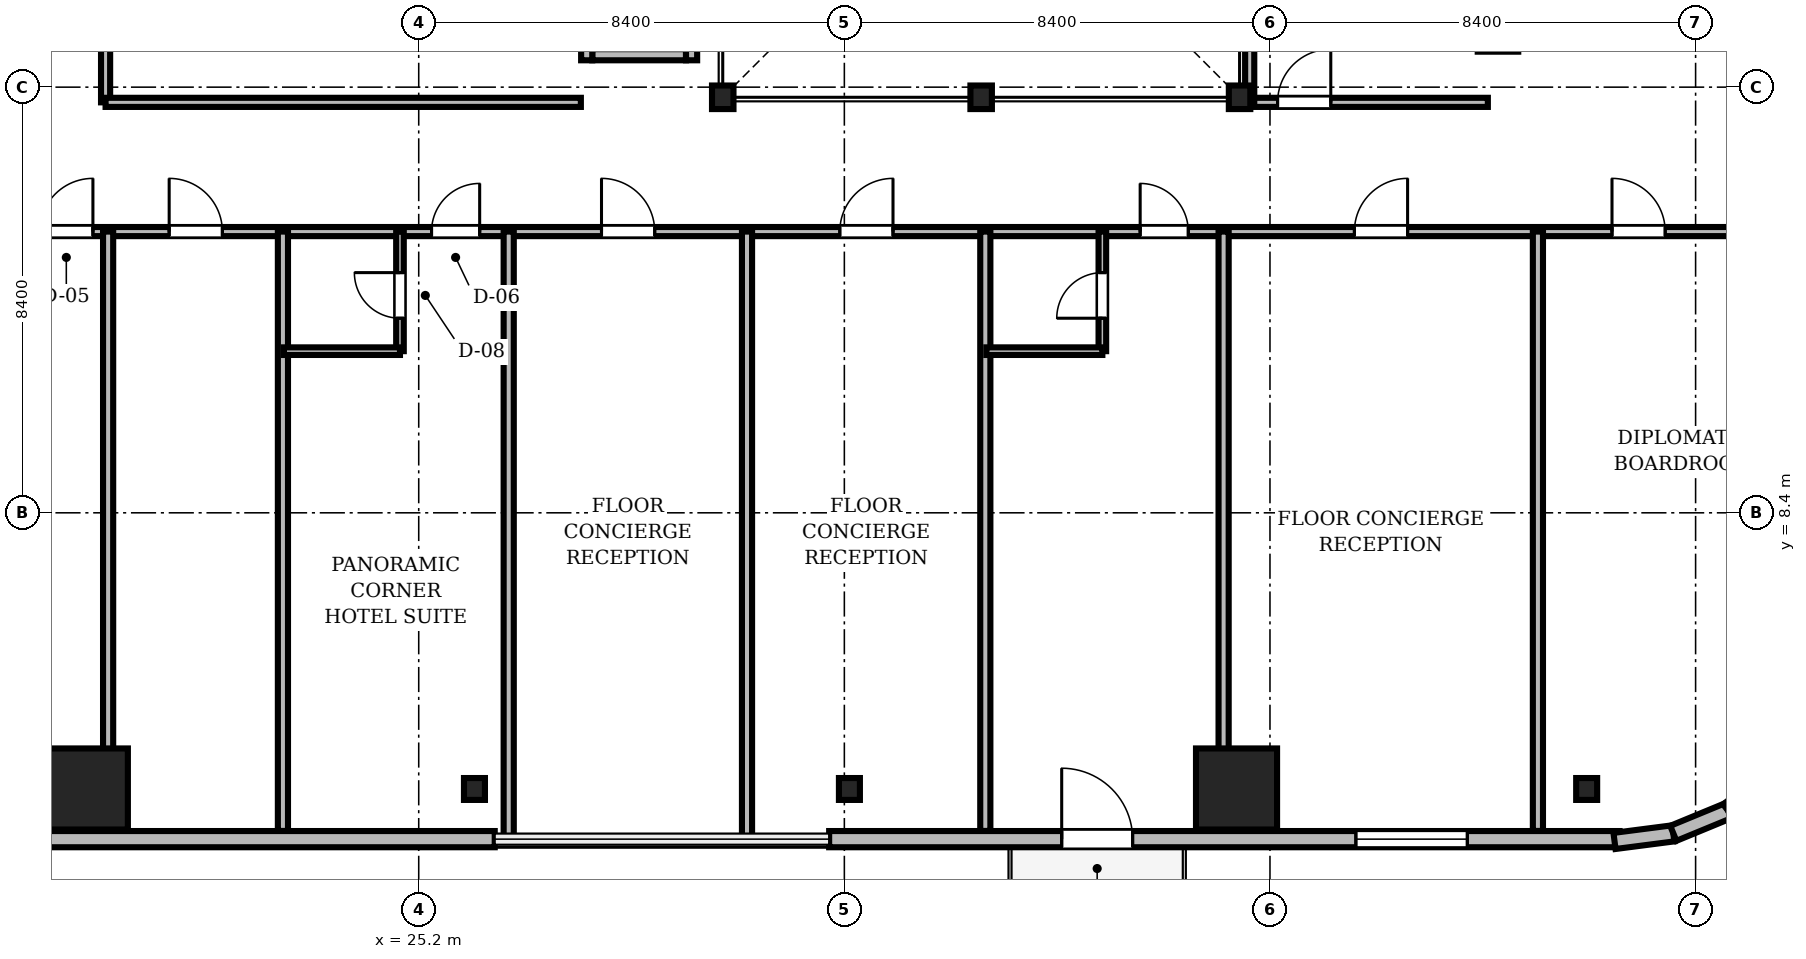
"""IFC4 building model, lengths in metres.
Left out: names, types, materials, properties, quantities, classifications, styles, units other than length and angle.
Written with IfcOpenShell. Run it as: python <this file> out.ifc"""

import sys

from ifc_helpers import new_model, si_unit, direction, frame, frame_2d, origin, origin_2d, place, context, subcontext, project, spatial, rectangle, i_section, extrude, source, transform, mapped, element, fill, save


model = new_model("IFC4")
c1 = context("Model", 3, precision=1e-05, world=origin(), true_north=direction((0.0, 1.0)))
c2 = subcontext(c1, "Body", "Model", "MODEL_VIEW")
j1 = project(units=[si_unit("LENGTHUNIT", "METRE"), si_unit("PLANEANGLEUNIT", "RADIAN")], contexts=[c1])
p1 = place(None, origin())
s1 = spatial("IfcSite", under=j1, at=p1, CompositionType="ELEMENT")
p2 = place(p1, origin())
s2 = spatial("IfcBuilding", under=s1, at=p2, CompositionType="ELEMENT")
p3 = place(p2, frame((0.0, 0.0, 152.0)))
s3 = spatial("IfcBuildingStorey", under=s2, at=p3, CompositionType="ELEMENT", Elevation=152.0)
m1 = source(origin(), c2, "Body", "SweptSolid", [
    extrude(i_section(OverallWidth=0.424, OverallDepth=0.465, WebThickness=0.035, FlangeThickness=0.056, FilletRadius=0.015, at=origin_2d()), origin(), (0.0, 0.0, 1.0), 3.46),
])
for number, where, z_axis, x_axis in (
    (1, (31.2, 16.6, 0.0), (0.0, 0.0, 1.0), (1.0, 0.0, 0.0)),
    (2, (36.3, 16.6, 0.0), (0.0, 0.0, 1.0), (1.0, 0.0, 0.0)),
    (3, (41.4, 16.6, 0.0), (0.0, 0.0, 1.0), (1.0, 0.0, 0.0)),
):
    element("IfcColumn", number, at=place(p3, frame(where, z_axis=z_axis, x_axis=x_axis)), inside=s3, PredefinedType="COLUMN", context=c2, shape_type="MappedRepresentation", body=[
        mapped(m1, transform((0.0, 0.0, 0.0), scale=1.0)),
    ])
m2 = source(origin(), c2, "Body", "SweptSolid", [
    extrude(rectangle(XDim=1.6, YDim=1.6, at=origin_2d()), origin(), (0.0, 0.0, 1.0), 3.46),
])
for number, where, z_axis, x_axis in (
    (4, (18.66, 2.95, 0.0), (0.0, 0.0, 1.0), (1.0, 0.0, 0.0)),
    (5, (41.34, 2.95, 0.0), (0.0, 0.0, 1.0), (1.0, 0.0, 0.0)),
):
    element("IfcColumn", number, at=place(p3, frame(where, z_axis=z_axis, x_axis=x_axis)), inside=s3, PredefinedType="COLUMN", context=c2, shape_type="MappedRepresentation", body=[
        mapped(m2, transform((0.0, 0.0, 0.0), scale=1.0)),
    ])
m3 = source(origin(), c2, "Body", "SweptSolid", [
    extrude(i_section(OverallWidth=0.414, OverallDepth=0.432, WebThickness=0.026, FlangeThickness=0.04, FilletRadius=0.015, at=origin_2d()), origin(), (0.0, 0.0, 1.0), 3.46),
])
for number, where, z_axis, x_axis in (
    (6, (26.3, 2.95, 0.0), (0.0, 0.0, 1.0), (1.0, 0.0, 0.0)),
    (7, (33.7, 2.95, 0.0), (0.0, 0.0, 1.0), (1.0, 0.0, 0.0)),
    (8, (48.25, 2.95, 0.0), (0.0, 0.0, 1.0), (1.0, 0.0, 0.0)),
):
    element("IfcColumn", number, at=place(p3, frame(where, z_axis=z_axis, x_axis=x_axis)), inside=s3, PredefinedType="COLUMN", context=c2, shape_type="MappedRepresentation", body=[
        mapped(m3, transform((0.0, 0.0, 0.0), scale=1.0)),
    ])
m4 = source(origin(), c2, "Body", "SweptSolid", [
    extrude(rectangle(XDim=15.6, YDim=0.32, at=frame_2d((7.8, 0.0))), origin(), (0.0, 0.0, 1.0), 3.46),
])
p4 = place(p3, frame((11.1, 1.96, 0.0), z_axis=(0.0, 0.0, 1.0), x_axis=(1.0, 0.0, 0.0)))
e9 = element("IfcWall", 9, at=p4, inside=s3, PredefinedType="SOLIDWALL", context=c2, shape_type="MappedRepresentation", body=[
    mapped(m4, transform((0.0, 0.0, 0.0), scale=1.0)),
])
m5 = source(origin(), c2, "Body", "SweptSolid", [
    extrude(rectangle(XDim=2.2, YDim=2.4, at=frame_2d((1.1, 1.2))), frame((0.0, 0.17, 0.0), z_axis=(0.0, -1.0, 0.0), x_axis=(1.0, 0.0, 0.0)), (0.0, 0.0, 1.0), 0.34),
])
p5 = place(p4, frame((3.005, 0.0, 0.72)))
e10 = element("IfcOpeningElement", 10, at=p5, cuts=e9, PredefinedType="OPENING", context=c2, shape_type="MappedRepresentation", body=[
    mapped(m5, transform((0.0, 0.0, 0.0), scale=1.0)),
])
p6 = place(p3, frame((33.3, 1.96, 0.0), z_axis=(0.0, 0.0, 1.0), x_axis=(1.0, 0.0, 0.0)))
e11 = element("IfcWall", 11, at=p6, inside=s3, PredefinedType="SOLIDWALL", context=c2, shape_type="MappedRepresentation", body=[
    mapped(m4, transform((0.0, 0.0, 0.0), scale=1.0)),
])
m6 = source(origin(), c2, "Body", "SweptSolid", [
    extrude(rectangle(XDim=1.4, YDim=2.3, at=frame_2d((0.7, 1.15))), frame((0.0, 0.17, 0.0), z_axis=(0.0, -1.0, 0.0), x_axis=(1.0, 0.0, 0.0)), (0.0, 0.0, 1.0), 0.34),
])
p7 = place(p6, frame((4.59, 0.0, 0.0)))
e12 = element("IfcOpeningElement", 12, at=p7, cuts=e11, PredefinedType="OPENING", context=c2, shape_type="MappedRepresentation", body=[
    mapped(m6, transform((0.0, 0.0, 0.0), scale=1.0)),
])
p8 = place(p6, frame((10.395, 0.0, 0.72)))
e13 = element("IfcOpeningElement", 13, at=p8, cuts=e11, PredefinedType="OPENING", context=c2, shape_type="MappedRepresentation", body=[
    mapped(m5, transform((0.0, 0.0, 0.0), scale=1.0)),
])
m7 = source(origin(), c2, "Body", "SweptSolid", [
    extrude(rectangle(XDim=1.17, YDim=0.32, at=frame_2d((0.585, 0.0))), origin(), (0.0, 0.0, 1.0), 3.46),
])
p9 = place(p3, frame((48.8, 1.925, 0.0), z_axis=(0.0, 0.0, 1.0), x_axis=(0.991762485493, 0.128090485085, 0.0)))
e14 = element("IfcWall", 14, at=p9, inside=s3, PredefinedType="SOLIDWALL", context=c2, shape_type="MappedRepresentation", body=[
    mapped(m7, transform((0.0, 0.0, 0.0), scale=1.0)),
])
m8 = source(origin(), c2, "Body", "SweptSolid", [
    extrude(rectangle(XDim=1.169, YDim=0.32, at=frame_2d((0.585, 0.0))), origin(), (0.0, 0.0, 1.0), 3.46),
])
p10 = place(p3, frame((49.96, 2.074, 0.0), z_axis=(0.0, 0.0, 1.0), x_axis=(0.924479075121, 0.381232789334, 0.0)))
e15 = element("IfcWall", 15, at=p10, inside=s3, PredefinedType="SOLIDWALL", context=c2, shape_type="MappedRepresentation", body=[
    mapped(m8, transform((0.0, 0.0, 0.0), scale=1.0)),
])
m9 = source(origin(), c2, "Body", "SweptSolid", [
    extrude(rectangle(XDim=1.169, YDim=0.32, at=frame_2d((0.584, 0.0))), origin(), (0.0, 0.0, 1.0), 3.46),
])
p11 = place(p3, frame((51.041, 2.52, 0.0), z_axis=(0.0, 0.0, 1.0), x_axis=(0.793663520347, 0.608356981114, 0.0)))
e16 = element("IfcWall", 16, at=p11, inside=s3, PredefinedType="SOLIDWALL", context=c2, shape_type="MappedRepresentation", body=[
    mapped(m9, transform((0.0, 0.0, 0.0), scale=1.0)),
])
m10 = source(origin(), c2, "Body", "SweptSolid", [
    extrude(rectangle(XDim=1.85, YDim=0.22, at=frame_2d((0.925, 0.0))), origin(), (0.0, 0.0, 1.0), 3.46),
])
p12 = place(p3, frame((28.625, 17.44, 0.0), z_axis=(0.0, 0.0, 1.0), x_axis=(1.0, 0.0, 0.0)))
e17 = element("IfcWall", 17, at=p12, inside=s3, PredefinedType="SOLIDWALL", context=c2, shape_type="MappedRepresentation", body=[
    mapped(m10, transform((0.0, 0.0, 0.0), scale=1.0)),
])
m11 = source(origin(), c2, "Body", "SweptSolid", [
    extrude(rectangle(XDim=2.54, YDim=0.22, at=frame_2d((1.27, 0.0))), origin(), (0.0, 0.0, 1.0), 3.46),
])
for number, where, z_axis, x_axis in (
    (18, (28.515, 17.33, 0.0), (0.0, 0.0, 1.0), (0.0, 1.0, 0.0)),
    (19, (30.585, 17.33, 0.0), (0.0, 0.0, 1.0), (0.0, 1.0, 0.0)),
):
    element("IfcWall", number, at=place(p3, frame(where, z_axis=z_axis, x_axis=x_axis)), inside=s3, PredefinedType="SOLIDWALL", context=c2, shape_type="MappedRepresentation", body=[
        mapped(m11, transform((0.0, 0.0, 0.0), scale=1.0)),
    ])
m12 = source(origin(), c2, "Body", "SweptSolid", [
    extrude(rectangle(XDim=46.156, YDim=0.18, at=frame_2d((23.078, 0.0))), origin(), (0.0, 0.0, 1.0), 2.702),
])
p13 = place(p3, frame((6.922, 13.95, 0.0), z_axis=(0.0, 0.0, 1.0), x_axis=(1.0, 0.0, 0.0)))
e20 = element("IfcWall", 20, at=p13, inside=s3, PredefinedType="PARTITIONING", context=c2, shape_type="MappedRepresentation", body=[
    mapped(m12, transform((0.0, 0.0, 0.0), scale=1.0)),
])
m13 = source(origin(), c2, "Body", "SweptSolid", [
    extrude(rectangle(XDim=1.05, YDim=2.2, at=frame_2d((0.525, 1.1))), frame((0.0, 0.1, 0.0), z_axis=(0.0, -1.0, 0.0), x_axis=(1.0, 0.0, 0.0)), (0.0, 0.0, 1.0), 0.2),
])
p14 = place(p13, frame((10.798, 0.0, 0.0)))
e21 = element("IfcOpeningElement", 21, at=p14, cuts=e20, PredefinedType="OPENING", context=c2, shape_type="MappedRepresentation", body=[
    mapped(m13, transform((0.0, 0.0, 0.0), scale=1.0)),
])
p15 = place(p13, frame((13.353, 0.0, 0.0)))
e22 = element("IfcOpeningElement", 22, at=p15, cuts=e20, PredefinedType="OPENING", context=c2, shape_type="MappedRepresentation", body=[
    mapped(m13, transform((0.0, 0.0, 0.0), scale=1.0)),
])
m14 = source(origin(), c2, "Body", "SweptSolid", [
    extrude(rectangle(XDim=0.95, YDim=2.15, at=frame_2d((0.475, 1.075))), frame((0.0, 0.1, 0.0), z_axis=(0.0, -1.0, 0.0), x_axis=(1.0, 0.0, 0.0)), (0.0, 0.0, 1.0), 0.2),
])
p16 = place(p13, frame((18.531, 0.0, 0.0)))
e23 = element("IfcOpeningElement", 23, at=p16, cuts=e20, PredefinedType="OPENING", context=c2, shape_type="MappedRepresentation", body=[
    mapped(m14, transform((0.0, 0.0, 0.0), scale=1.0)),
])
p17 = place(p13, frame((21.885, 0.0, 0.0)))
e24 = element("IfcOpeningElement", 24, at=p17, cuts=e20, PredefinedType="OPENING", context=c2, shape_type="MappedRepresentation", body=[
    mapped(m13, transform((0.0, 0.0, 0.0), scale=1.0)),
])
p18 = place(p13, frame((26.588, 0.0, 0.0)))
e25 = element("IfcOpeningElement", 25, at=p18, cuts=e20, PredefinedType="OPENING", context=c2, shape_type="MappedRepresentation", body=[
    mapped(m13, transform((0.0, 0.0, 0.0), scale=1.0)),
])
p19 = place(p13, frame((32.516, 0.0, 0.0)))
e26 = element("IfcOpeningElement", 26, at=p19, cuts=e20, PredefinedType="OPENING", context=c2, shape_type="MappedRepresentation", body=[
    mapped(m14, transform((0.0, 0.0, 0.0), scale=1.0)),
])
p20 = place(p13, frame((36.744, 0.0, 0.0)))
e27 = element("IfcOpeningElement", 27, at=p20, cuts=e20, PredefinedType="OPENING", context=c2, shape_type="MappedRepresentation", body=[
    mapped(m13, transform((0.0, 0.0, 0.0), scale=1.0)),
])
p21 = place(p13, frame((41.828, 0.0, 0.0)))
e28 = element("IfcOpeningElement", 28, at=p21, cuts=e20, PredefinedType="OPENING", context=c2, shape_type="MappedRepresentation", body=[
    mapped(m13, transform((0.0, 0.0, 0.0), scale=1.0)),
])
m15 = source(origin(), c2, "Body", "SweptSolid", [
    extrude(rectangle(XDim=11.94, YDim=0.18, at=frame_2d((5.97, 0.0))), origin(), (0.0, 0.0, 1.0), 2.852),
])
p22 = place(p3, frame((19.02, 16.5, 0.0), z_axis=(0.0, 0.0, 1.0), x_axis=(0.0, 1.0, 0.0)))
e29 = element("IfcWall", 29, at=p22, inside=s3, PredefinedType="PARTITIONING", context=c2, shape_type="MappedRepresentation", body=[
    mapped(m15, transform((0.0, 0.0, 0.0), scale=1.0)),
])
p23 = place(p22, frame((4.5, 0.0, 0.0)))
e30 = element("IfcOpeningElement", 30, at=p23, cuts=e29, PredefinedType="OPENING", context=c2, shape_type="MappedRepresentation", body=[
    mapped(m13, transform((0.0, 0.0, 0.0), scale=1.0)),
])
m16 = source(origin(), c2, "Body", "SweptSolid", [
    extrude(rectangle(XDim=4.7, YDim=0.18, at=frame_2d((2.35, 0.0))), origin(), (0.0, 0.0, 1.0), 2.852),
])
p24 = place(p3, frame((41.6, 16.5, 0.0), z_axis=(0.0, 0.0, 1.0), x_axis=(1.0, 0.0, 0.0)))
e31 = element("IfcWall", 31, at=p24, inside=s3, PredefinedType="PARTITIONING", context=c2, shape_type="MappedRepresentation", body=[
    mapped(m16, transform((0.0, 0.0, 0.0), scale=1.0)),
])
p25 = place(p24, frame((0.55, 0.0, 0.0)))
e32 = element("IfcOpeningElement", 32, at=p25, cuts=e31, PredefinedType="OPENING", context=c2, shape_type="MappedRepresentation", body=[
    mapped(m13, transform((0.0, 0.0, 0.0), scale=1.0)),
])
m17 = source(origin(), c2, "Body", "SweptSolid", [
    extrude(rectangle(XDim=2.36, YDim=0.15, at=frame_2d((1.18, 0.0))), origin(), (0.0, 0.0, 1.0), 3.122),
])
p26 = place(p3, frame((24.83, 11.59, 0.0), z_axis=(0.0, 0.0, 1.0), x_axis=(0.0, 1.0, 0.0)))
e33 = element("IfcWall", 33, at=p26, inside=s3, PredefinedType="PARTITIONING", context=c2, shape_type="MappedRepresentation", body=[
    mapped(m17, transform((0.0, 0.0, 0.0), scale=1.0)),
])
m18 = source(origin(), c2, "Body", "SweptSolid", [
    extrude(rectangle(XDim=0.9, YDim=2.1, at=frame_2d((0.45, 1.05))), frame((0.0, 0.085, 0.0), z_axis=(0.0, -1.0, 0.0), x_axis=(1.0, 0.0, 0.0)), (0.0, 0.0, 1.0), 0.17),
])
p27 = place(p26, frame((0.65, 0.0, 0.0)))
e34 = element("IfcOpeningElement", 34, at=p27, cuts=e33, PredefinedType="OPENING", context=c2, shape_type="MappedRepresentation", body=[
    mapped(m18, transform((0.0, 0.0, 0.0), scale=1.0)),
])
p28 = place(p3, frame((38.692, 11.59, 0.0), z_axis=(0.0, 0.0, 1.0), x_axis=(0.0, 1.0, 0.0)))
e35 = element("IfcWall", 35, at=p28, inside=s3, PredefinedType="PARTITIONING", context=c2, shape_type="MappedRepresentation", body=[
    mapped(m17, transform((0.0, 0.0, 0.0), scale=1.0)),
])
p29 = place(p28, frame((0.65, 0.0, 0.0)))
e36 = element("IfcOpeningElement", 36, at=p29, cuts=e35, PredefinedType="OPENING", context=c2, shape_type="MappedRepresentation", body=[
    mapped(m18, transform((0.0, 0.0, 0.0), scale=1.0)),
])
m19 = source(origin(), c2, "Body", "SweptSolid", [
    extrude(rectangle(XDim=11.828, YDim=0.2, at=frame_2d((5.914, 0.0))), origin(), (0.0, 0.0, 1.0), 2.702),
])
for number, where, z_axis, x_axis in (
    (37, (19.07, 2.122, 0.0), (0.0, 0.0, 1.0), (0.0, 1.0, 0.0)),
    (38, (22.52, 2.122, 0.0), (0.0, 0.0, 1.0), (0.0, 1.0, 0.0)),
):
    element("IfcWall", number, at=place(p3, frame(where, z_axis=z_axis, x_axis=x_axis)), inside=s3, PredefinedType="PARTITIONING", context=c2, shape_type="MappedRepresentation", body=[
        mapped(m19, transform((0.0, 0.0, 0.0), scale=1.0)),
    ])
m20 = source(origin(), c2, "Body", "SweptSolid", [
    extrude(rectangle(XDim=12.02, YDim=0.2, at=frame_2d((6.01, 0.0))), origin(), (0.0, 0.0, 1.0), 2.702),
])
for number, where, z_axis, x_axis in (
    (39, (26.976, 1.93, 0.0), (0.0, 0.0, 1.0), (0.0, 1.0, 0.0)),
    (40, (31.679, 1.93, 0.0), (0.0, 0.0, 1.0), (0.0, 1.0, 0.0)),
):
    element("IfcWall", number, at=place(p3, frame(where, z_axis=z_axis, x_axis=x_axis)), inside=s3, PredefinedType="PARTITIONING", context=c2, shape_type="MappedRepresentation", body=[
        mapped(m20, transform((0.0, 0.0, 0.0), scale=1.0)),
    ])
for number, where, z_axis, x_axis in (
    (41, (36.382, 2.122, 0.0), (0.0, 0.0, 1.0), (0.0, 1.0, 0.0)),
    (42, (41.085, 2.122, 0.0), (0.0, 0.0, 1.0), (0.0, 1.0, 0.0)),
    (43, (47.288, 2.122, 0.0), (0.0, 0.0, 1.0), (0.0, 1.0, 0.0)),
):
    element("IfcWall", number, at=place(p3, frame(where, z_axis=z_axis, x_axis=x_axis)), inside=s3, PredefinedType="PARTITIONING", context=c2, shape_type="MappedRepresentation", body=[
        mapped(m19, transform((0.0, 0.0, 0.0), scale=1.0)),
    ])
m21 = source(origin(), c2, "Body", "SweptSolid", [
    extrude(rectangle(XDim=9.38, YDim=0.18, at=frame_2d((4.69, 0.0))), origin(), (0.0, 0.0, 1.0), 3.46),
])
p30 = place(p3, frame((19.02, 16.5, 0.0), z_axis=(0.0, 0.0, 1.0), x_axis=(1.0, 0.0, 0.0)))
e44 = element("IfcWall", 44, at=p30, inside=s3, PredefinedType="PARTITIONING", context=c2, shape_type="MappedRepresentation", body=[
    mapped(m21, transform((0.0, 0.0, 0.0), scale=1.0)),
])
m22 = source(origin(), c2, "Body", "SweptSolid", [
    extrude(rectangle(XDim=7.15, YDim=0.18, at=frame_2d((3.575, 0.0))), origin(), (0.0, 0.0, 1.0), 2.852),
])
p31 = place(p3, frame((41.6, 16.5, 0.0), z_axis=(0.0, 0.0, 1.0), x_axis=(0.0, 1.0, 0.0)))
e45 = element("IfcWall", 45, at=p31, inside=s3, PredefinedType="PARTITIONING", context=c2, shape_type="MappedRepresentation", body=[
    mapped(m22, transform((0.0, 0.0, 0.0), scale=1.0)),
])
m23 = source(origin(), c2, "Body", "SweptSolid", [
    extrude(rectangle(XDim=2.29, YDim=0.15, at=frame_2d((1.145, 0.0))), origin(), (0.0, 0.0, 1.0), 3.46),
])
p32 = place(p3, frame((22.54, 11.59, 0.0), z_axis=(0.0, 0.0, 1.0), x_axis=(1.0, 0.0, 0.0)))
e46 = element("IfcWall", 46, at=p32, inside=s3, PredefinedType="PARTITIONING", context=c2, shape_type="MappedRepresentation", body=[
    mapped(m23, transform((0.0, 0.0, 0.0), scale=1.0)),
])
m24 = source(origin(), c2, "Body", "SweptSolid", [
    extrude(rectangle(XDim=2.29, YDim=0.15, at=frame_2d((1.145, 0.0))), origin(), (0.0, 0.0, 1.0), 3.46),
])
p33 = place(p3, frame((36.402, 11.59, 0.0), z_axis=(0.0, 0.0, 1.0), x_axis=(1.0, 0.0, 0.0)))
e47 = element("IfcWall", 47, at=p33, inside=s3, PredefinedType="PARTITIONING", context=c2, shape_type="MappedRepresentation", body=[
    mapped(m24, transform((0.0, 0.0, 0.0), scale=1.0)),
])
m25 = source(origin(), c2, "Body", "SweptSolid", [
    extrude(rectangle(XDim=1.4, YDim=2.3, at=frame_2d((0.7, 1.15))), frame((0.0, 0.025, 0.0), z_axis=(0.0, -1.0, 0.0), x_axis=(1.0, 0.0, 0.0)), (0.0, 0.0, 1.0), 0.05),
])
p34 = place(p7, frame((1.4, 0.0, 0.0), z_axis=(0.0, 0.0, 1.0), x_axis=(-1.0, 0.0, 0.0)))
e48 = element("IfcDoor", 48, at=p34, inside=s3, OperationType="DOUBLE_DOOR_SLIDING", PredefinedType="DOOR", context=c2, shape_type="MappedRepresentation", body=[
    mapped(m25, transform((0.0, 0.0, 0.0), scale=1.0)),
])
fill(e12, e48)
m26 = source(origin(), c2, "Body", "SweptSolid", [
    extrude(rectangle(XDim=2.2, YDim=2.4, at=frame_2d((1.1, 1.2))), frame((0.0, 0.03, 0.0), z_axis=(0.0, -1.0, 0.0), x_axis=(1.0, 0.0, 0.0)), (0.0, 0.0, 1.0), 0.06),
])
p35 = place(p8, origin())
e49 = element("IfcWindow", 49, at=p35, inside=s3, PartitioningType="SINGLE_PANEL", PredefinedType="WINDOW", context=c2, shape_type="MappedRepresentation", body=[
    mapped(m26, transform((0.0, 0.0, 0.0), scale=1.0)),
])
fill(e13, e49)
m27 = source(origin(), c2, "Body", "SweptSolid", [
    extrude(rectangle(XDim=1.05, YDim=2.2, at=frame_2d((0.525, 1.1))), frame((0.0, 0.025, 0.0), z_axis=(0.0, -1.0, 0.0), x_axis=(1.0, 0.0, 0.0)), (0.0, 0.0, 1.0), 0.05),
])
p36 = place(p14, origin())
e50 = element("IfcDoor", 50, at=p36, inside=s3, OperationType="SINGLE_SWING_RIGHT", PredefinedType="DOOR", context=c2, shape_type="MappedRepresentation", body=[
    mapped(m27, transform((0.0, 0.0, 0.0), scale=1.0)),
])
fill(e21, e50)
p37 = place(p15, origin())
e51 = element("IfcDoor", 51, at=p37, inside=s3, OperationType="SINGLE_SWING_LEFT", PredefinedType="DOOR", context=c2, shape_type="MappedRepresentation", body=[
    mapped(m27, transform((0.0, 0.0, 0.0), scale=1.0)),
])
fill(e22, e51)
m28 = source(origin(), c2, "Body", "SweptSolid", [
    extrude(rectangle(XDim=0.95, YDim=2.15, at=frame_2d((0.475, 1.075))), frame((0.0, 0.025, 0.0), z_axis=(0.0, -1.0, 0.0), x_axis=(1.0, 0.0, 0.0)), (0.0, 0.0, 1.0), 0.05),
])
p38 = place(p16, origin())
e52 = element("IfcDoor", 52, at=p38, inside=s3, OperationType="SINGLE_SWING_RIGHT", PredefinedType="DOOR", context=c2, shape_type="MappedRepresentation", body=[
    mapped(m28, transform((0.0, 0.0, 0.0), scale=1.0)),
])
fill(e23, e52)
p39 = place(p17, origin())
e53 = element("IfcDoor", 53, at=p39, inside=s3, OperationType="SINGLE_SWING_LEFT", PredefinedType="DOOR", context=c2, shape_type="MappedRepresentation", body=[
    mapped(m27, transform((0.0, 0.0, 0.0), scale=1.0)),
])
fill(e24, e53)
p40 = place(p18, origin())
e54 = element("IfcDoor", 54, at=p40, inside=s3, OperationType="SINGLE_SWING_RIGHT", PredefinedType="DOOR", context=c2, shape_type="MappedRepresentation", body=[
    mapped(m27, transform((0.0, 0.0, 0.0), scale=1.0)),
])
fill(e25, e54)
p41 = place(p19, origin())
e55 = element("IfcDoor", 55, at=p41, inside=s3, OperationType="SINGLE_SWING_LEFT", PredefinedType="DOOR", context=c2, shape_type="MappedRepresentation", body=[
    mapped(m28, transform((0.0, 0.0, 0.0), scale=1.0)),
])
fill(e26, e55)
p42 = place(p20, origin())
e56 = element("IfcDoor", 56, at=p42, inside=s3, OperationType="SINGLE_SWING_RIGHT", PredefinedType="DOOR", context=c2, shape_type="MappedRepresentation", body=[
    mapped(m27, transform((0.0, 0.0, 0.0), scale=1.0)),
])
fill(e27, e56)
p43 = place(p21, origin())
e57 = element("IfcDoor", 57, at=p43, inside=s3, OperationType="SINGLE_SWING_LEFT", PredefinedType="DOOR", context=c2, shape_type="MappedRepresentation", body=[
    mapped(m27, transform((0.0, 0.0, 0.0), scale=1.0)),
])
fill(e28, e57)
p44 = place(p25, origin())
e58 = element("IfcDoor", 58, at=p44, inside=s3, OperationType="SINGLE_SWING_RIGHT", PredefinedType="DOOR", context=c2, shape_type="MappedRepresentation", body=[
    mapped(m27, transform((0.0, 0.0, 0.0), scale=1.0)),
])
fill(e32, e58)
m29 = source(origin(), c2, "Body", "SweptSolid", [
    extrude(rectangle(XDim=0.9, YDim=2.1, at=frame_2d((0.45, 1.05))), frame((0.0, 0.025, 0.0), z_axis=(0.0, -1.0, 0.0), x_axis=(1.0, 0.0, 0.0)), (0.0, 0.0, 1.0), 0.05),
])
p45 = place(p27, origin())
e59 = element("IfcDoor", 59, at=p45, inside=s3, OperationType="SINGLE_SWING_RIGHT", PredefinedType="DOOR", context=c2, shape_type="MappedRepresentation", body=[
    mapped(m29, transform((0.0, 0.0, 0.0), scale=1.0)),
])
fill(e34, e59)
p46 = place(p29, origin())
e60 = element("IfcDoor", 60, at=p46, inside=s3, OperationType="SINGLE_SWING_LEFT", PredefinedType="DOOR", context=c2, shape_type="MappedRepresentation", body=[
    mapped(m29, transform((0.0, 0.0, 0.0), scale=1.0)),
])
fill(e36, e60)
save(model, sys.argv[1])
